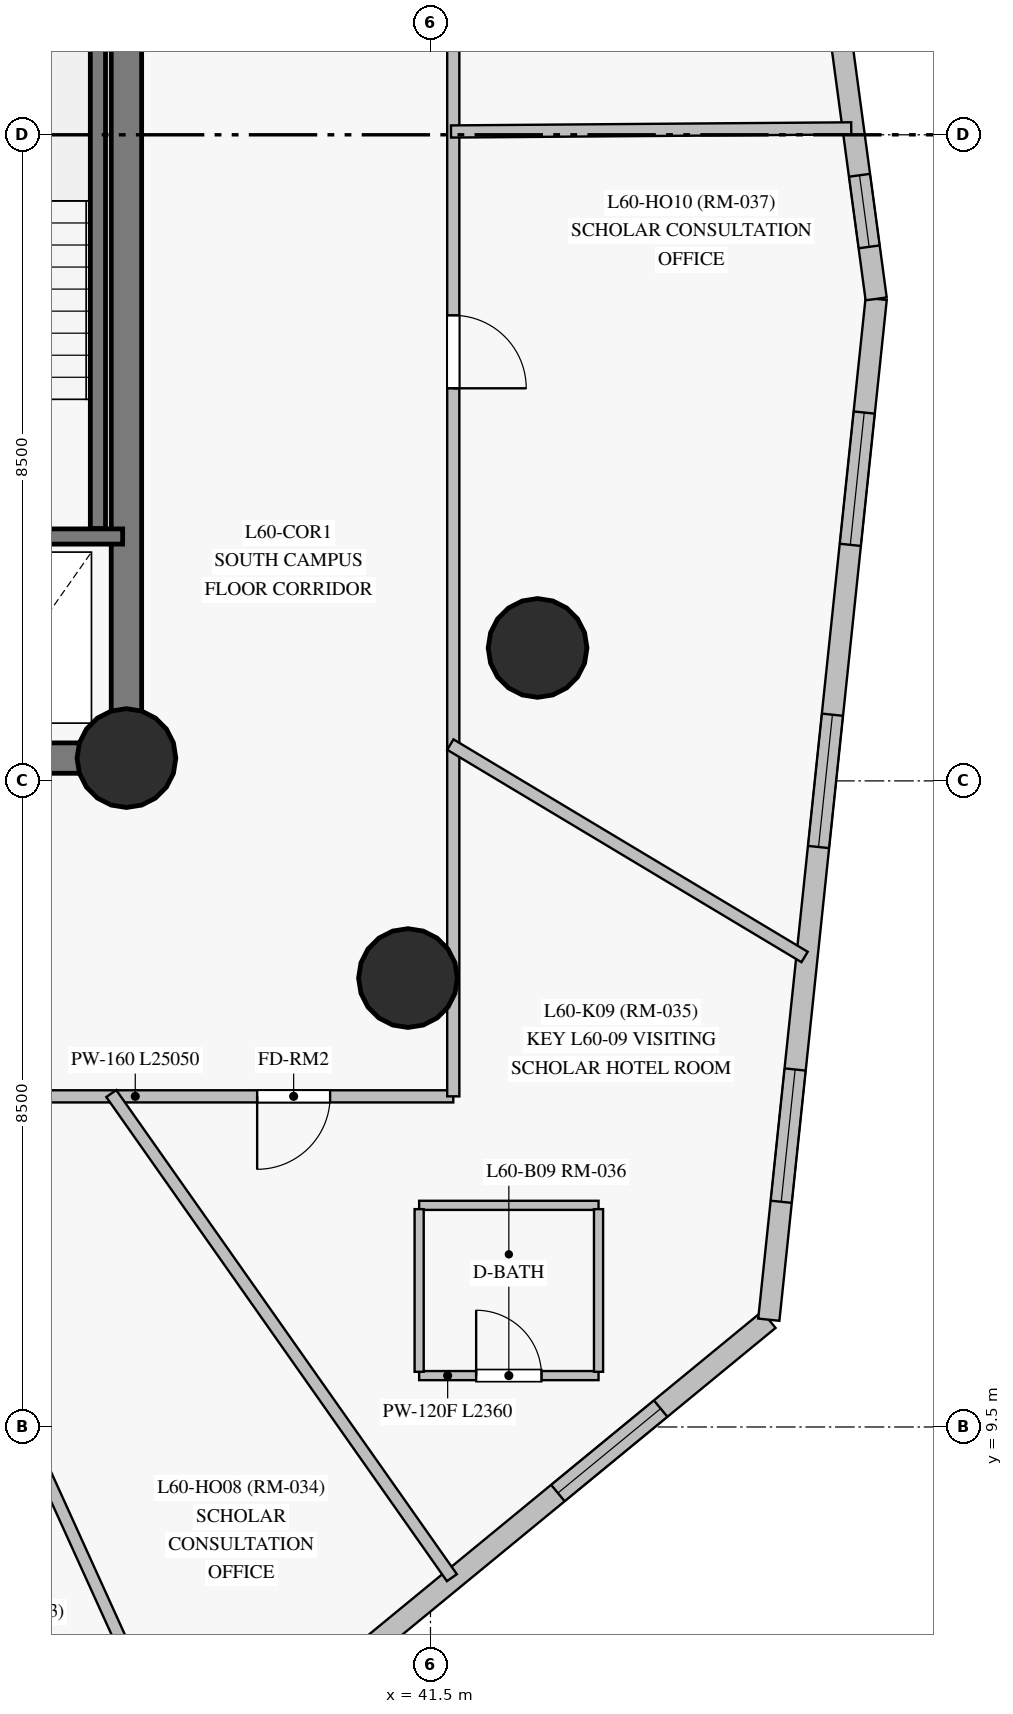
"""IFC4 building model, lengths in metres.
Left out: names, types, materials, properties, quantities, classifications, styles, units other than length and angle.
Written with IfcOpenShell. Run it as: python <this file> out.ifc"""

import sys

from ifc_helpers import new_model, si_unit, direction, frame, frame_2d, origin, origin_with_axes, origin_2d, place, context, subcontext, project, spatial, rectangle, circle, extrude, source, transform, mapped, element, fill, save


model = new_model("IFC4")
c1 = context("Model", 3, precision=1e-05, world=origin(), true_north=direction((0.0, 1.0)))
c2 = subcontext(c1, "Body", "Model", "MODEL_VIEW")
j1 = project(units=[si_unit("LENGTHUNIT", "METRE"), si_unit("PLANEANGLEUNIT", "RADIAN")], contexts=[c1])
p1 = place(None, origin())
s1 = spatial("IfcSite", under=j1, at=p1, CompositionType="ELEMENT")
p2 = place(p1, origin())
s2 = spatial("IfcBuilding", under=s1, at=p2, CompositionType="ELEMENT")
p3 = place(p2, frame((0.0, 0.0, 205.35)))
s3 = spatial("IfcBuildingStorey", under=s2, at=p3, CompositionType="ELEMENT", Elevation=205.35)
p4 = place(p3, frame((26.55, 18.3, 0.0), z_axis=(0.0, 0.0, 1.0), x_axis=(1.0, 0.0, 0.0)))
e1 = element("IfcWall", 1, at=p4, inside=s3, PredefinedType="SHEAR", context=c2, shape_type="SweptSolid", body=[
    extrude(rectangle(XDim=10.95, YDim=0.4, at=frame_2d((5.475, 0.0))), origin(), (0.0, 0.0, 1.0), 2.775),
])
p5 = place(p4, frame((4.55, 0.0, 0.0)))
e2 = element("IfcOpeningElement", 2, at=p5, cuts=e1, PredefinedType="OPENING", context=c2, shape_type="SweptSolid", body=[
    extrude(rectangle(XDim=1.4, YDim=2.2, at=frame_2d((0.7, 1.1))), frame((0.0, 0.21, 0.0), z_axis=(0.0, -1.0, 0.0), x_axis=(1.0, 0.0, 0.0)), (0.0, 0.0, 1.0), 0.42),
])
p6 = place(p3, frame((37.5, 18.3, 0.0), z_axis=(0.0, 0.0, 1.0), x_axis=(0.0, 1.0, 0.0)))
e3 = element("IfcWall", 3, at=p6, inside=s3, PredefinedType="SHEAR", context=c2, shape_type="SweptSolid", body=[
    extrude(rectangle(XDim=16.4, YDim=0.4, at=frame_2d((8.2, 0.0))), origin(), (0.0, 0.0, 1.0), 2.775),
])
p7 = place(p6, frame((13.85, 0.0, 0.0)))
e4 = element("IfcOpeningElement", 4, at=p7, cuts=e3, PredefinedType="OPENING", context=c2, shape_type="SweptSolid", body=[
    extrude(rectangle(XDim=1.2, YDim=2.15, at=frame_2d((0.6, 1.075))), frame((0.0, 0.21, 0.0), z_axis=(0.0, -1.0, 0.0), x_axis=(1.0, 0.0, 0.0)), (0.0, 0.0, 1.0), 0.42),
])
m1 = source(origin_with_axes(), c2, "Body", "SweptSolid", [
    extrude(circle(Radius=0.65, at=origin_2d()), origin(), (0.0, 0.0, 1.0), 3.05),
])
for number, where, z_axis, x_axis in (
    (5, (37.5, 18.3, 0.0), (0.0, 0.0, 1.0), (1.0, 0.0, 0.0)),
    (6, (42.909, 19.749, 0.0), (0.0, 0.0, 1.0), (1.0, 0.0, 0.0)),
    (7, (41.204, 15.406, 0.0), (0.0, 0.0, 1.0), (1.0, 0.0, 0.0)),
):
    element("IfcColumn", number, at=place(p3, frame(where, z_axis=z_axis, x_axis=x_axis)), inside=s3, PredefinedType="COLUMN", context=c2, shape_type="MappedRepresentation", body=[
        mapped(m1, transform((0.0, 0.0, 0.0), scale=1.0)),
    ])
p8 = place(p3, frame((38.284, 4.61, 0.0), z_axis=(0.0, 0.0, 1.0), x_axis=(0.772578860193, 0.634918817474, 0.0)))
e8 = element("IfcWall", 8, at=p8, inside=s3, PredefinedType="SOLIDWALL", context=c2, shape_type="SweptSolid", body=[
    extrude(rectangle(XDim=9.925, YDim=0.28, at=frame_2d((4.962, 0.0))), origin(), (0.0, 0.0, 1.0), 2.775),
])
p9 = place(p8, frame((1.45, 0.0, 0.85)))
e9 = element("IfcOpeningElement", 9, at=p9, cuts=e8, PredefinedType="OPENING", context=c2, shape_type="SweptSolid", body=[
    extrude(rectangle(XDim=1.75, YDim=1.65, at=frame_2d((0.875, 0.825))), frame((0.0, 0.15, 0.0), z_axis=(0.0, -1.0, 0.0), x_axis=(1.0, 0.0, 0.0)), (0.0, 0.0, 1.0), 0.3),
])
p10 = place(p8, frame((6.333, 0.0, 0.85)))
e10 = element("IfcOpeningElement", 10, at=p10, cuts=e8, PredefinedType="OPENING", context=c2, shape_type="SweptSolid", body=[
    extrude(rectangle(XDim=1.75, YDim=1.65, at=frame_2d((0.875, 0.825))), frame((0.0, 0.15, 0.0), z_axis=(0.0, -1.0, 0.0), x_axis=(1.0, 0.0, 0.0)), (0.0, 0.0, 1.0), 0.3),
])
p11 = place(p3, frame((45.951, 10.912, 0.0), z_axis=(0.0, 0.0, 1.0), x_axis=(0.104607612257, 0.99451357329, 0.0)))
e11 = element("IfcWall", 11, at=p11, inside=s3, PredefinedType="SOLIDWALL", context=c2, shape_type="SweptSolid", body=[
    extrude(rectangle(XDim=13.504, YDim=0.28, at=frame_2d((6.752, 0.0))), origin(), (0.0, 0.0, 1.0), 2.775),
])
p12 = place(p11, frame((1.56, 0.0, 0.85)))
e12 = element("IfcOpeningElement", 12, at=p12, cuts=e11, PredefinedType="OPENING", context=c2, shape_type="SweptSolid", body=[
    extrude(rectangle(XDim=1.75, YDim=1.65, at=frame_2d((0.875, 0.825))), frame((0.0, 0.15, 0.0), z_axis=(0.0, -1.0, 0.0), x_axis=(1.0, 0.0, 0.0)), (0.0, 0.0, 1.0), 0.3),
])
p13 = place(p11, frame((6.253, 0.0, 0.85)))
e13 = element("IfcOpeningElement", 13, at=p13, cuts=e11, PredefinedType="OPENING", context=c2, shape_type="SweptSolid", body=[
    extrude(rectangle(XDim=1.75, YDim=1.65, at=frame_2d((0.875, 0.825))), frame((0.0, 0.15, 0.0), z_axis=(0.0, -1.0, 0.0), x_axis=(1.0, 0.0, 0.0)), (0.0, 0.0, 1.0), 0.3),
])
p14 = place(p11, frame((10.25, 0.0, 0.85)))
e14 = element("IfcOpeningElement", 14, at=p14, cuts=e11, PredefinedType="OPENING", context=c2, shape_type="SweptSolid", body=[
    extrude(rectangle(XDim=1.75, YDim=1.65, at=frame_2d((0.875, 0.825))), frame((0.0, 0.15, 0.0), z_axis=(0.0, -1.0, 0.0), x_axis=(1.0, 0.0, 0.0)), (0.0, 0.0, 1.0), 0.3),
])
p15 = place(p3, frame((47.364, 24.341, 0.0), z_axis=(0.0, 0.0, 1.0), x_axis=(-0.133639101201, 0.991030065452, 0.0)))
e15 = element("IfcWall", 15, at=p15, inside=s3, PredefinedType="SOLIDWALL", context=c2, shape_type="SweptSolid", body=[
    extrude(rectangle(XDim=9.321, YDim=0.28, at=frame_2d((4.66, 0.0))), origin(), (0.0, 0.0, 1.0), 2.775),
])
p16 = place(p15, frame((0.691, 0.0, 0.85)))
e16 = element("IfcOpeningElement", 16, at=p16, cuts=e15, PredefinedType="OPENING", context=c2, shape_type="SweptSolid", body=[
    extrude(rectangle(XDim=0.95, YDim=1.5, at=frame_2d((0.475, 0.75))), frame((0.0, 0.15, 0.0), z_axis=(0.0, -1.0, 0.0), x_axis=(1.0, 0.0, 0.0)), (0.0, 0.0, 1.0), 0.3),
])
p17 = place(p15, frame((4.891, 0.0, 0.85)))
e17 = element("IfcOpeningElement", 17, at=p17, cuts=e15, PredefinedType="OPENING", context=c2, shape_type="SweptSolid", body=[
    extrude(rectangle(XDim=1.75, YDim=1.65, at=frame_2d((0.875, 0.825))), frame((0.0, 0.15, 0.0), z_axis=(0.0, -1.0, 0.0), x_axis=(1.0, 0.0, 0.0)), (0.0, 0.0, 1.0), 0.3),
])
p18 = place(p3, frame((37.125, 21.32, 0.0), z_axis=(0.0, 0.0, 1.0), x_axis=(0.0, 1.0, 0.0)))
e18 = element("IfcWall", 18, at=p18, inside=s3, PredefinedType="SHEAR", context=c2, shape_type="SweptSolid", body=[
    extrude(rectangle(XDim=7.5, YDim=0.2, at=frame_2d((3.75, 0.0))), origin(), (0.0, 0.0, 1.0), 2.775),
])
p19 = place(p3, frame((33.455, 21.215, 0.0), z_axis=(0.0, 0.0, 1.0), x_axis=(1.0, 0.0, 0.0)))
e19 = element("IfcWall", 19, at=p19, inside=s3, PredefinedType="SHEAR", context=c2, shape_type="SweptSolid", body=[
    extrude(rectangle(XDim=3.995, YDim=0.2, at=frame_2d((1.998, 0.0))), origin(), (0.0, 0.0, 1.0), 2.775),
])
p20 = place(p3, frame((41.8, 13.85, 0.0), z_axis=(0.0, 0.0, 1.0), x_axis=(-1.0, 0.0, 0.0)))
e20 = element("IfcWall", 20, at=p20, inside=s3, PredefinedType="PARTITIONING", context=c2, shape_type="SweptSolid", body=[
    extrude(rectangle(XDim=25.05, YDim=0.16, at=frame_2d((12.525, 0.0))), origin(), (0.0, 0.0, 1.0), 2.225),
])
p21 = place(p20, frame((1.62, 0.0, 0.0)))
e21 = element("IfcOpeningElement", 21, at=p21, cuts=e20, PredefinedType="OPENING", context=c2, shape_type="SweptSolid", body=[
    extrude(rectangle(XDim=0.96, YDim=2.15, at=frame_2d((0.48, 1.075))), frame((0.0, 0.09, 0.0), z_axis=(0.0, -1.0, 0.0), x_axis=(1.0, 0.0, 0.0)), (0.0, 0.0, 1.0), 0.18),
])
p22 = place(p20, frame((21.952, 0.0, 0.0)))
e22 = element("IfcOpeningElement", 22, at=p22, cuts=e20, PredefinedType="OPENING", context=c2, shape_type="SweptSolid", body=[
    extrude(rectangle(XDim=0.96, YDim=2.15, at=frame_2d((0.48, 1.075))), frame((0.0, 0.09, 0.0), z_axis=(0.0, -1.0, 0.0), x_axis=(1.0, 0.0, 0.0)), (0.0, 0.0, 1.0), 0.18),
])
p23 = place(p20, frame((18.312, 0.0, 0.0)))
e23 = element("IfcOpeningElement", 23, at=p23, cuts=e20, PredefinedType="OPENING", context=c2, shape_type="SweptSolid", body=[
    extrude(rectangle(XDim=0.96, YDim=2.15, at=frame_2d((0.48, 1.075))), frame((0.0, 0.09, 0.0), z_axis=(0.0, -1.0, 0.0), x_axis=(1.0, 0.0, 0.0)), (0.0, 0.0, 1.0), 0.18),
])
p24 = place(p20, frame((15.808, 0.0, 0.0)))
e24 = element("IfcOpeningElement", 24, at=p24, cuts=e20, PredefinedType="OPENING", context=c2, shape_type="SweptSolid", body=[
    extrude(rectangle(XDim=0.96, YDim=2.15, at=frame_2d((0.48, 1.075))), frame((0.0, 0.09, 0.0), z_axis=(0.0, -1.0, 0.0), x_axis=(1.0, 0.0, 0.0)), (0.0, 0.0, 1.0), 0.18),
])
p25 = place(p20, frame((12.79, 0.0, 0.0)))
e25 = element("IfcOpeningElement", 25, at=p25, cuts=e20, PredefinedType="OPENING", context=c2, shape_type="SweptSolid", body=[
    extrude(rectangle(XDim=0.96, YDim=2.15, at=frame_2d((0.48, 1.075))), frame((0.0, 0.09, 0.0), z_axis=(0.0, -1.0, 0.0), x_axis=(1.0, 0.0, 0.0)), (0.0, 0.0, 1.0), 0.18),
])
p26 = place(p20, frame((10.756, 0.0, 0.0)))
e26 = element("IfcOpeningElement", 26, at=p26, cuts=e20, PredefinedType="OPENING", context=c2, shape_type="SweptSolid", body=[
    extrude(rectangle(XDim=0.96, YDim=2.15, at=frame_2d((0.48, 1.075))), frame((0.0, 0.09, 0.0), z_axis=(0.0, -1.0, 0.0), x_axis=(1.0, 0.0, 0.0)), (0.0, 0.0, 1.0), 0.18),
])
p27 = place(p20, frame((8.292, 0.0, 0.0)))
e27 = element("IfcOpeningElement", 27, at=p27, cuts=e20, PredefinedType="OPENING", context=c2, shape_type="SweptSolid", body=[
    extrude(rectangle(XDim=0.96, YDim=2.15, at=frame_2d((0.48, 1.075))), frame((0.0, 0.09, 0.0), z_axis=(0.0, -1.0, 0.0), x_axis=(1.0, 0.0, 0.0)), (0.0, 0.0, 1.0), 0.18),
])
p28 = place(p20, frame((5.788, 0.0, 0.0)))
e28 = element("IfcOpeningElement", 28, at=p28, cuts=e20, PredefinedType="OPENING", context=c2, shape_type="SweptSolid", body=[
    extrude(rectangle(XDim=0.96, YDim=2.15, at=frame_2d((0.48, 1.075))), frame((0.0, 0.09, 0.0), z_axis=(0.0, -1.0, 0.0), x_axis=(1.0, 0.0, 0.0)), (0.0, 0.0, 1.0), 0.18),
])
p29 = place(p3, frame((41.8, 33.45, 0.0), z_axis=(0.0, 0.0, 1.0), x_axis=(0.0, -1.0, 0.0)))
e29 = element("IfcWall", 29, at=p29, inside=s3, PredefinedType="PARTITIONING", context=c2, shape_type="SweptSolid", body=[
    extrude(rectangle(XDim=19.6, YDim=0.16, at=frame_2d((9.8, 0.0))), origin(), (0.0, 0.0, 1.0), 2.225),
])
p30 = place(p29, frame((9.325, 0.0, 0.0)))
e30 = element("IfcOpeningElement", 30, at=p30, cuts=e29, PredefinedType="OPENING", context=c2, shape_type="SweptSolid", body=[
    extrude(rectangle(XDim=0.96, YDim=2.15, at=frame_2d((0.48, 1.075))), frame((0.0, 0.09, 0.0), z_axis=(0.0, -1.0, 0.0), x_axis=(1.0, 0.0, 0.0)), (0.0, 0.0, 1.0), 0.18),
])
p31 = place(p29, frame((4.425, 0.0, 0.0)))
e31 = element("IfcOpeningElement", 31, at=p31, cuts=e29, PredefinedType="OPENING", context=c2, shape_type="SweptSolid", body=[
    extrude(rectangle(XDim=0.96, YDim=2.15, at=frame_2d((0.48, 1.075))), frame((0.0, 0.09, 0.0), z_axis=(0.0, -1.0, 0.0), x_axis=(1.0, 0.0, 0.0)), (0.0, 0.0, 1.0), 0.18),
])
p32 = place(p3, frame((34.165, 13.877, 0.0), z_axis=(0.0, 0.0, 1.0), x_axis=(0.413396417062, -0.910551153072, 0.0)))
e32 = element("IfcWall", 32, at=p32, inside=s3, PredefinedType="PARTITIONING", context=c2, shape_type="SweptSolid", body=[
    extrude(rectangle(XDim=10.091, YDim=0.16, at=frame_2d((5.045, 0.0))), origin(), (0.0, 0.0, 1.0), 2.775),
])
p33 = place(p3, frame((37.301, 13.887, 0.0), z_axis=(0.0, 0.0, 1.0), x_axis=(0.575425843923, -0.817853958935, 0.0)))
e33 = element("IfcWall", 33, at=p33, inside=s3, PredefinedType="PARTITIONING", context=c2, shape_type="SweptSolid", body=[
    extrude(rectangle(XDim=7.788, YDim=0.16, at=frame_2d((3.894, 0.0))), origin(), (0.0, 0.0, 1.0), 2.775),
])
p34 = place(p3, frame((41.761, 18.478, 0.0), z_axis=(0.0, 0.0, 1.0), x_axis=(0.857619753575, -0.514284316579, 0.0)))
e34 = element("IfcWall", 34, at=p34, inside=s3, PredefinedType="PARTITIONING", context=c2, shape_type="SweptSolid", body=[
    extrude(rectangle(XDim=5.434, YDim=0.16, at=frame_2d((2.717, 0.0))), origin(), (0.0, 0.0, 1.0), 2.775),
])
p35 = place(p3, frame((41.77, 26.543, 0.0), z_axis=(0.0, 0.0, 1.0), x_axis=(0.999969299607, 0.007835805241, 0.0)))
e35 = element("IfcWall", 35, at=p35, inside=s3, PredefinedType="PARTITIONING", context=c2, shape_type="SweptSolid", body=[
    extrude(rectangle(XDim=5.266, YDim=0.16, at=frame_2d((2.633, 0.0))), origin(), (0.0, 0.0, 1.0), 2.775),
])
p36 = place(p3, frame((41.351, 10.176, 0.0), z_axis=(0.0, 0.0, 1.0), x_axis=(1.0, 0.0, 0.0)))
e36 = element("IfcWall", 36, at=p36, inside=s3, PredefinedType="PARTITIONING", context=c2, shape_type="SweptSolid", body=[
    extrude(rectangle(XDim=2.36, YDim=0.12, at=frame_2d((1.18, 0.0))), origin(), (0.0, 0.0, 1.0), 2.775),
])
p37 = place(p36, frame((0.75, 0.0, 0.0)))
e37 = element("IfcOpeningElement", 37, at=p37, cuts=e36, PredefinedType="OPENING", context=c2, shape_type="SweptSolid", body=[
    extrude(rectangle(XDim=0.86, YDim=2.1, at=frame_2d((0.43, 1.05))), frame((0.0, 0.07, 0.0), z_axis=(0.0, -1.0, 0.0), x_axis=(1.0, 0.0, 0.0)), (0.0, 0.0, 1.0), 0.14),
])
p38 = place(p3, frame((43.711, 12.416, 0.0), z_axis=(0.0, 0.0, 1.0), x_axis=(-1.0, 0.0, 0.0)))
e38 = element("IfcWall", 38, at=p38, inside=s3, PredefinedType="PARTITIONING", context=c2, shape_type="SweptSolid", body=[
    extrude(rectangle(XDim=2.36, YDim=0.12, at=frame_2d((1.18, 0.0))), origin(), (0.0, 0.0, 1.0), 2.775),
])
for number, where, z_axis, x_axis in (
    (39, (43.711, 10.226, 0.0), (0.0, 0.0, 1.0), (0.0, 1.0, 0.0)),
    (40, (41.351, 12.366, 0.0), (0.0, 0.0, 1.0), (0.0, -1.0, 0.0)),
):
    element("IfcWall", number, at=place(p3, frame(where, z_axis=z_axis, x_axis=x_axis)), inside=s3, PredefinedType="PARTITIONING", context=c2, shape_type="SweptSolid", body=[
        extrude(rectangle(XDim=2.14, YDim=0.12, at=frame_2d((1.07, 0.0))), origin(), (0.0, 0.0, 1.0), 2.775),
    ])
m2 = source(origin_with_axes(), c2, "Body", "SweptSolid", [
    extrude(rectangle(XDim=1.75, YDim=1.65, at=frame_2d((0.875, 0.825))), frame((0.0, 0.03, 0.0), z_axis=(0.0, -1.0, 0.0), x_axis=(1.0, 0.0, 0.0)), (0.0, 0.0, 1.0), 0.06),
])
p39 = place(p10, origin())
e41 = element("IfcWindow", 41, at=p39, inside=s3, PartitioningType="SINGLE_PANEL", PredefinedType="WINDOW", context=c2, shape_type="MappedRepresentation", body=[
    mapped(m2, transform((0.0, 0.0, 0.0), scale=1.0)),
])
fill(e10, e41)
p40 = place(p12, origin())
e42 = element("IfcWindow", 42, at=p40, inside=s3, PartitioningType="SINGLE_PANEL", PredefinedType="WINDOW", context=c2, shape_type="MappedRepresentation", body=[
    mapped(m2, transform((0.0, 0.0, 0.0), scale=1.0)),
])
fill(e12, e42)
p41 = place(p13, origin())
e43 = element("IfcWindow", 43, at=p41, inside=s3, PartitioningType="SINGLE_PANEL", PredefinedType="WINDOW", context=c2, shape_type="MappedRepresentation", body=[
    mapped(m2, transform((0.0, 0.0, 0.0), scale=1.0)),
])
fill(e13, e43)
p42 = place(p14, origin())
e44 = element("IfcWindow", 44, at=p42, inside=s3, PartitioningType="SINGLE_PANEL", PredefinedType="WINDOW", context=c2, shape_type="MappedRepresentation", body=[
    mapped(m2, transform((0.0, 0.0, 0.0), scale=1.0)),
])
fill(e14, e44)
m3 = source(origin_with_axes(), c2, "Body", "SweptSolid", [
    extrude(rectangle(XDim=0.95, YDim=1.5, at=frame_2d((0.475, 0.75))), frame((0.0, 0.03, 0.0), z_axis=(0.0, -1.0, 0.0), x_axis=(1.0, 0.0, 0.0)), (0.0, 0.0, 1.0), 0.06),
])
p43 = place(p16, origin())
e45 = element("IfcWindow", 45, at=p43, inside=s3, PartitioningType="SINGLE_PANEL", PredefinedType="WINDOW", context=c2, shape_type="MappedRepresentation", body=[
    mapped(m3, transform((0.0, 0.0, 0.0), scale=1.0)),
])
fill(e16, e45)
m4 = source(origin_with_axes(), c2, "Body", "SweptSolid", [
    extrude(rectangle(XDim=0.86, YDim=2.1, at=frame_2d((0.43, 1.05))), frame((0.0, 0.025, 0.0), z_axis=(0.0, -1.0, 0.0), x_axis=(1.0, 0.0, 0.0)), (0.0, 0.0, 1.0), 0.05),
])
p44 = place(p37, origin())
e46 = element("IfcDoor", 46, at=p44, inside=s3, OperationType="SINGLE_SWING_LEFT", PredefinedType="DOOR", context=c2, shape_type="MappedRepresentation", body=[
    mapped(m4, transform((0.0, 0.0, 0.0), scale=1.0)),
])
fill(e37, e46)
m5 = source(origin_with_axes(), c2, "Body", "SweptSolid", [
    extrude(rectangle(XDim=0.96, YDim=2.15, at=frame_2d((0.48, 1.075))), frame((0.0, 0.025, 0.0), z_axis=(0.0, -1.0, 0.0), x_axis=(1.0, 0.0, 0.0)), (0.0, 0.0, 1.0), 0.05),
])
p45 = place(p21, origin())
e47 = element("IfcDoor", 47, at=p45, inside=s3, OperationType="SINGLE_SWING_RIGHT", PredefinedType="DOOR", context=c2, shape_type="MappedRepresentation", body=[
    mapped(m5, transform((0.0, 0.0, 0.0), scale=1.0)),
])
fill(e21, e47)
p46 = place(p30, origin())
e48 = element("IfcDoor", 48, at=p46, inside=s3, OperationType="SINGLE_SWING_RIGHT", PredefinedType="DOOR", context=c2, shape_type="MappedRepresentation", body=[
    mapped(m5, transform((0.0, 0.0, 0.0), scale=1.0)),
])
fill(e30, e48)
save(model, sys.argv[1])
